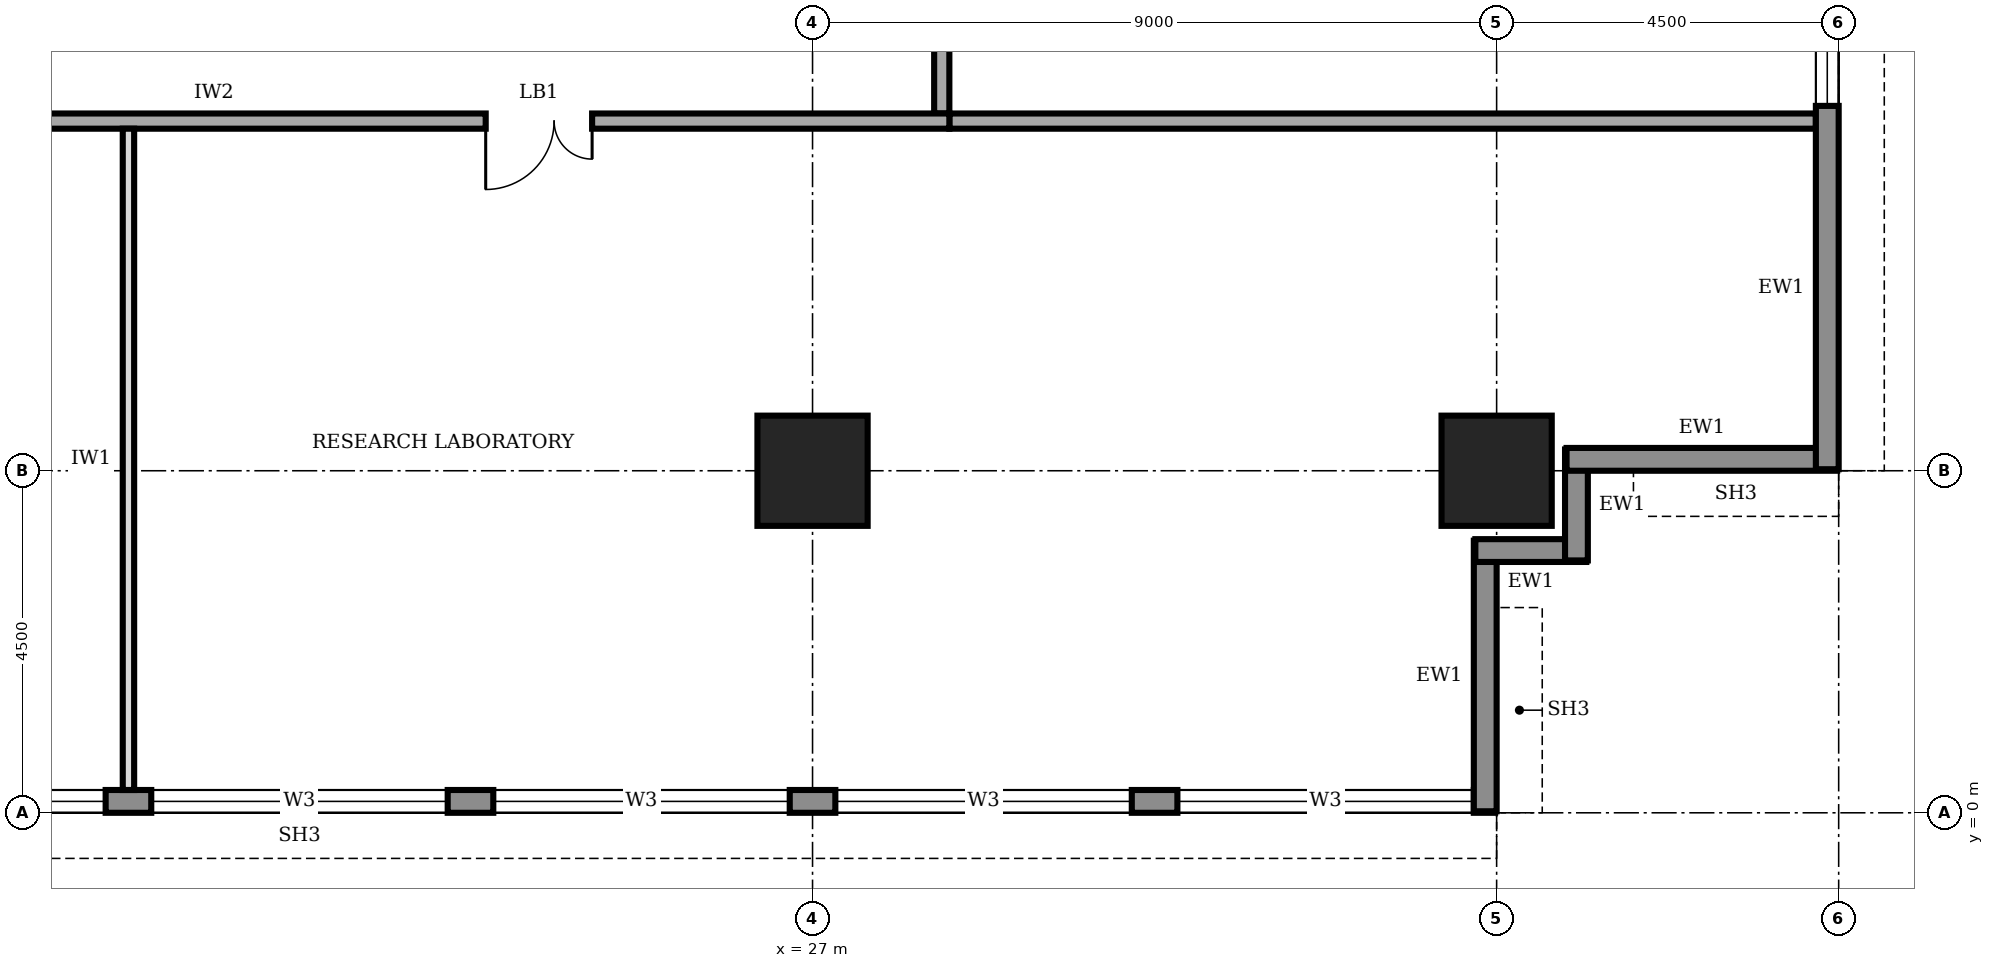
"""IFC4 building model, lengths in metres.
Left out: names, types, materials, properties, quantities, classifications, styles, units other than length and angle.
Written with IfcOpenShell. Run it as: python <this file> out.ifc"""

import sys

from ifc_helpers import new_model, si_unit, direction, frame, frame_2d, origin, origin_2d, place, context, subcontext, project, spatial, rectangle, extrude, element, fill, save


model = new_model("IFC4")
c1 = context("Model", 3, precision=1e-05, world=origin(), true_north=direction((0.0, 1.0)))
c2 = subcontext(c1, "Body", "Model", "MODEL_VIEW")
j1 = project(units=[si_unit("LENGTHUNIT", "METRE"), si_unit("PLANEANGLEUNIT", "RADIAN")], contexts=[c1])
p1 = place(None, origin())
s1 = spatial("IfcSite", under=j1, at=p1, CompositionType="ELEMENT")
p2 = place(p1, origin())
s2 = spatial("IfcBuilding", under=s1, at=p2, CompositionType="ELEMENT")
p3 = place(p2, frame((0.0, 0.0, 261.0)))
s3 = spatial("IfcBuildingStorey", under=s2, at=p3, CompositionType="ELEMENT", Elevation=261.0)
for number, where, z_axis, x_axis in (
    (1, (27.0, 4.5, 0.0), (0.0, 0.0, 1.0), (1.0, 0.0, 0.0)),
    (2, (36.0, 4.5, 0.0), (0.0, 0.0, 1.0), (1.0, 0.0, 0.0)),
):
    element("IfcColumn", number, at=place(p3, frame(where, z_axis=z_axis, x_axis=x_axis)), inside=s3, PredefinedType="COLUMN", context=c2, shape_type="SweptSolid", body=[
        extrude(rectangle(XDim=1.45, YDim=1.45, at=origin_2d()), origin(), (0.0, 0.0, 1.0), 4.0),
    ])
p4 = place(p3, frame((4.52, 0.15, 0.0), z_axis=(0.0, 0.0, 1.0), x_axis=(1.0, 0.0, 0.0)))
e3 = element("IfcWall", 3, at=p4, inside=s3, PredefinedType="STANDARD", context=c2, shape_type="SweptSolid", body=[
    extrude(rectangle(XDim=31.46, YDim=0.3, at=frame_2d((15.73, 0.0))), origin(), (0.0, 0.0, 1.0), 3.75),
])
p5 = place(p4, frame((4.78, 0.0, 0.95)))
e4 = element("IfcOpeningElement", 4, at=p5, cuts=e3, PredefinedType="OPENING", context=c2, shape_type="SweptSolid", body=[
    extrude(rectangle(XDim=3.9, YDim=1.8, at=frame_2d((1.95, 0.9))), frame((0.0, 0.16, 0.0), z_axis=(0.0, -1.0, 0.0), x_axis=(1.0, 0.0, 0.0)), (0.0, 0.0, 1.0), 0.32),
])
p6 = place(p4, frame((9.28, 0.0, 0.95)))
e5 = element("IfcOpeningElement", 5, at=p6, cuts=e3, PredefinedType="OPENING", context=c2, shape_type="SweptSolid", body=[
    extrude(rectangle(XDim=3.9, YDim=1.8, at=frame_2d((1.95, 0.9))), frame((0.0, 0.16, 0.0), z_axis=(0.0, -1.0, 0.0), x_axis=(1.0, 0.0, 0.0)), (0.0, 0.0, 1.0), 0.32),
])
p7 = place(p4, frame((13.78, 0.0, 0.95)))
e6 = element("IfcOpeningElement", 6, at=p7, cuts=e3, PredefinedType="OPENING", context=c2, shape_type="SweptSolid", body=[
    extrude(rectangle(XDim=3.9, YDim=1.8, at=frame_2d((1.95, 0.9))), frame((0.0, 0.16, 0.0), z_axis=(0.0, -1.0, 0.0), x_axis=(1.0, 0.0, 0.0)), (0.0, 0.0, 1.0), 0.32),
])
p8 = place(p4, frame((18.28, 0.0, 0.95)))
e7 = element("IfcOpeningElement", 7, at=p8, cuts=e3, PredefinedType="OPENING", context=c2, shape_type="SweptSolid", body=[
    extrude(rectangle(XDim=3.9, YDim=1.8, at=frame_2d((1.95, 0.9))), frame((0.0, 0.16, 0.0), z_axis=(0.0, -1.0, 0.0), x_axis=(1.0, 0.0, 0.0)), (0.0, 0.0, 1.0), 0.32),
])
p9 = place(p4, frame((22.78, 0.0, 0.95)))
e8 = element("IfcOpeningElement", 8, at=p9, cuts=e3, PredefinedType="OPENING", context=c2, shape_type="SweptSolid", body=[
    extrude(rectangle(XDim=3.9, YDim=1.8, at=frame_2d((1.95, 0.9))), frame((0.0, 0.16, 0.0), z_axis=(0.0, -1.0, 0.0), x_axis=(1.0, 0.0, 0.0)), (0.0, 0.0, 1.0), 0.32),
])
p10 = place(p4, frame((27.28, 0.0, 0.95)))
e9 = element("IfcOpeningElement", 9, at=p10, cuts=e3, PredefinedType="OPENING", context=c2, shape_type="SweptSolid", body=[
    extrude(rectangle(XDim=3.9, YDim=1.8, at=frame_2d((1.95, 0.9))), frame((0.0, 0.16, 0.0), z_axis=(0.0, -1.0, 0.0), x_axis=(1.0, 0.0, 0.0)), (0.0, 0.0, 1.0), 0.32),
])
p11 = place(p3, frame((35.85, 0.02, 0.0), z_axis=(0.0, 0.0, 1.0), x_axis=(0.0, 1.0, 0.0)))
e10 = element("IfcWall", 10, at=p11, inside=s3, PredefinedType="STANDARD", context=c2, shape_type="SweptSolid", body=[
    extrude(rectangle(XDim=3.56, YDim=0.3, at=frame_2d((1.78, 0.0))), origin(), (0.0, 0.0, 1.0), 2.85),
])
for number, where, z_axis, x_axis in (
    (11, (35.72, 3.45, 0.0), (0.0, 0.0, 1.0), (1.0, 0.0, 0.0)),
    (12, (37.05, 3.32, 0.0), (0.0, 0.0, 1.0), (0.0, 1.0, 0.0)),
):
    element("IfcWall", number, at=place(p3, frame(where, z_axis=z_axis, x_axis=x_axis)), inside=s3, PredefinedType="STANDARD", context=c2, shape_type="SweptSolid", body=[
        extrude(rectangle(XDim=1.46, YDim=0.3, at=frame_2d((0.73, 0.0))), origin(), (0.0, 0.0, 1.0), 3.75),
    ])
p12 = place(p3, frame((36.92, 4.65, 0.0), z_axis=(0.0, 0.0, 1.0), x_axis=(1.0, 0.0, 0.0)))
e13 = element("IfcWall", 13, at=p12, inside=s3, PredefinedType="STANDARD", context=c2, shape_type="SweptSolid", body=[
    extrude(rectangle(XDim=3.56, YDim=0.3, at=frame_2d((1.78, 0.0))), origin(), (0.0, 0.0, 1.0), 2.85),
])
p13 = place(p3, frame((40.35, 4.52, 0.0), z_axis=(0.0, 0.0, 1.0), x_axis=(0.0, 1.0, 0.0)))
e14 = element("IfcWall", 14, at=p13, inside=s3, PredefinedType="STANDARD", context=c2, shape_type="SweptSolid", body=[
    extrude(rectangle(XDim=31.46, YDim=0.3, at=frame_2d((15.73, 0.0))), origin(), (0.0, 0.0, 1.0), 3.75),
])
p14 = place(p13, frame((4.78, 0.0, 0.95)))
e15 = element("IfcOpeningElement", 15, at=p14, cuts=e14, PredefinedType="OPENING", context=c2, shape_type="SweptSolid", body=[
    extrude(rectangle(XDim=3.9, YDim=1.8, at=frame_2d((1.95, 0.9))), frame((0.0, 0.16, 0.0), z_axis=(0.0, -1.0, 0.0), x_axis=(1.0, 0.0, 0.0)), (0.0, 0.0, 1.0), 0.32),
])
p15 = place(p13, frame((9.28, 0.0, 0.95)))
e16 = element("IfcOpeningElement", 16, at=p15, cuts=e14, PredefinedType="OPENING", context=c2, shape_type="SweptSolid", body=[
    extrude(rectangle(XDim=3.9, YDim=1.8, at=frame_2d((1.95, 0.9))), frame((0.0, 0.16, 0.0), z_axis=(0.0, -1.0, 0.0), x_axis=(1.0, 0.0, 0.0)), (0.0, 0.0, 1.0), 0.32),
])
p16 = place(p13, frame((13.78, 0.0, 0.95)))
e17 = element("IfcOpeningElement", 17, at=p16, cuts=e14, PredefinedType="OPENING", context=c2, shape_type="SweptSolid", body=[
    extrude(rectangle(XDim=3.9, YDim=1.8, at=frame_2d((1.95, 0.9))), frame((0.0, 0.16, 0.0), z_axis=(0.0, -1.0, 0.0), x_axis=(1.0, 0.0, 0.0)), (0.0, 0.0, 1.0), 0.32),
])
p17 = place(p13, frame((18.28, 0.0, 0.95)))
e18 = element("IfcOpeningElement", 18, at=p17, cuts=e14, PredefinedType="OPENING", context=c2, shape_type="SweptSolid", body=[
    extrude(rectangle(XDim=3.9, YDim=1.8, at=frame_2d((1.95, 0.9))), frame((0.0, 0.16, 0.0), z_axis=(0.0, -1.0, 0.0), x_axis=(1.0, 0.0, 0.0)), (0.0, 0.0, 1.0), 0.32),
])
p18 = place(p13, frame((22.78, 0.0, 0.95)))
e19 = element("IfcOpeningElement", 19, at=p18, cuts=e14, PredefinedType="OPENING", context=c2, shape_type="SweptSolid", body=[
    extrude(rectangle(XDim=3.9, YDim=1.8, at=frame_2d((1.95, 0.9))), frame((0.0, 0.16, 0.0), z_axis=(0.0, -1.0, 0.0), x_axis=(1.0, 0.0, 0.0)), (0.0, 0.0, 1.0), 0.32),
])
p19 = place(p13, frame((27.28, 0.0, 0.95)))
e20 = element("IfcOpeningElement", 20, at=p19, cuts=e14, PredefinedType="OPENING", context=c2, shape_type="SweptSolid", body=[
    extrude(rectangle(XDim=3.9, YDim=1.8, at=frame_2d((1.95, 0.9))), frame((0.0, 0.16, 0.0), z_axis=(0.0, -1.0, 0.0), x_axis=(1.0, 0.0, 0.0)), (0.0, 0.0, 1.0), 0.32),
])
p20 = place(p3, frame((11.9, 9.1, 0.0), z_axis=(0.0, 0.0, 1.0), x_axis=(1.0, 0.0, 0.0)))
e21 = element("IfcWall", 21, at=p20, inside=s3, PredefinedType="SOLIDWALL", context=c2, shape_type="SweptSolid", body=[
    extrude(rectangle(XDim=16.9, YDim=0.2, at=frame_2d((8.45, 0.0))), origin(), (0.0, 0.0, 1.0), 3.75),
])
p21 = place(p20, frame((2.25, 0.0, 0.0)))
e22 = element("IfcOpeningElement", 22, at=p21, cuts=e21, PredefinedType="OPENING", context=c2, shape_type="SweptSolid", body=[
    extrude(rectangle(XDim=1.4, YDim=2.1, at=frame_2d((0.7, 1.05))), frame((0.0, 0.11, 0.0), z_axis=(0.0, -1.0, 0.0), x_axis=(1.0, 0.0, 0.0)), (0.0, 0.0, 1.0), 0.22),
])
p22 = place(p20, frame((10.8, 0.0, 0.0)))
e23 = element("IfcOpeningElement", 23, at=p22, cuts=e21, PredefinedType="OPENING", context=c2, shape_type="SweptSolid", body=[
    extrude(rectangle(XDim=1.4, YDim=2.1, at=frame_2d((0.7, 1.05))), frame((0.0, 0.11, 0.0), z_axis=(0.0, -1.0, 0.0), x_axis=(1.0, 0.0, 0.0)), (0.0, 0.0, 1.0), 0.22),
])
p23 = place(p3, frame((28.7, 9.2, 0.0), z_axis=(0.0, 0.0, 1.0), x_axis=(0.0, 1.0, 0.0)))
e24 = element("IfcWall", 24, at=p23, inside=s3, PredefinedType="SOLIDWALL", context=c2, shape_type="SweptSolid", body=[
    extrude(rectangle(XDim=22.3, YDim=0.2, at=frame_2d((11.15, 0.0))), origin(), (0.0, 0.0, 1.0), 3.75),
])
p24 = place(p23, frame((1.55, 0.0, 0.0)))
e25 = element("IfcOpeningElement", 25, at=p24, cuts=e24, PredefinedType="OPENING", context=c2, shape_type="SweptSolid", body=[
    extrude(rectangle(XDim=1.0, YDim=2.1, at=frame_2d((0.5, 1.05))), frame((0.0, 0.11, 0.0), z_axis=(0.0, -1.0, 0.0), x_axis=(1.0, 0.0, 0.0)), (0.0, 0.0, 1.0), 0.22),
])
p25 = place(p23, frame((6.05, 0.0, 0.0)))
e26 = element("IfcOpeningElement", 26, at=p25, cuts=e24, PredefinedType="OPENING", context=c2, shape_type="SweptSolid", body=[
    extrude(rectangle(XDim=1.0, YDim=2.1, at=frame_2d((0.5, 1.05))), frame((0.0, 0.11, 0.0), z_axis=(0.0, -1.0, 0.0), x_axis=(1.0, 0.0, 0.0)), (0.0, 0.0, 1.0), 0.22),
])
p26 = place(p23, frame((10.55, 0.0, 0.0)))
e27 = element("IfcOpeningElement", 27, at=p26, cuts=e24, PredefinedType="OPENING", context=c2, shape_type="SweptSolid", body=[
    extrude(rectangle(XDim=1.0, YDim=2.1, at=frame_2d((0.5, 1.05))), frame((0.0, 0.11, 0.0), z_axis=(0.0, -1.0, 0.0), x_axis=(1.0, 0.0, 0.0)), (0.0, 0.0, 1.0), 0.22),
])
p27 = place(p23, frame((15.05, 0.0, 0.0)))
e28 = element("IfcOpeningElement", 28, at=p27, cuts=e24, PredefinedType="OPENING", context=c2, shape_type="SweptSolid", body=[
    extrude(rectangle(XDim=1.0, YDim=2.1, at=frame_2d((0.5, 1.05))), frame((0.0, 0.11, 0.0), z_axis=(0.0, -1.0, 0.0), x_axis=(1.0, 0.0, 0.0)), (0.0, 0.0, 1.0), 0.22),
])
p28 = place(p23, frame((19.55, 0.0, 0.0)))
e29 = element("IfcOpeningElement", 29, at=p28, cuts=e24, PredefinedType="OPENING", context=c2, shape_type="SweptSolid", body=[
    extrude(rectangle(XDim=1.0, YDim=2.1, at=frame_2d((0.5, 1.05))), frame((0.0, 0.11, 0.0), z_axis=(0.0, -1.0, 0.0), x_axis=(1.0, 0.0, 0.0)), (0.0, 0.0, 1.0), 0.22),
])
p29 = place(p3, frame((28.8, 9.1, 0.0), z_axis=(0.0, 0.0, 1.0), x_axis=(1.0, 0.0, 0.0)))
e30 = element("IfcWall", 30, at=p29, inside=s3, PredefinedType="SOLIDWALL", context=c2, shape_type="SweptSolid", body=[
    extrude(rectangle(XDim=11.4, YDim=0.2, at=frame_2d((5.7, 0.0))), origin(), (0.0, 0.0, 1.0), 3.75),
])
p30 = place(p3, frame((18.0, 0.3, 0.0), z_axis=(0.0, 0.0, 1.0), x_axis=(0.0, 1.0, 0.0)))
e31 = element("IfcWall", 31, at=p30, inside=s3, PredefinedType="PARTITIONING", context=c2, shape_type="SweptSolid", body=[
    extrude(rectangle(XDim=8.7, YDim=0.15, at=frame_2d((4.35, 0.0))), origin(), (0.0, 0.0, 1.0), 3.75),
])
p31 = place(p6, origin())
e32 = element("IfcWindow", 32, at=p31, inside=s3, PartitioningType="SINGLE_PANEL", PredefinedType="WINDOW", context=c2, shape_type="SweptSolid", body=[
    extrude(rectangle(XDim=3.9, YDim=1.8, at=frame_2d((1.95, 0.9))), frame((0.0, 0.03, 0.0), z_axis=(0.0, -1.0, 0.0), x_axis=(1.0, 0.0, 0.0)), (0.0, 0.0, 1.0), 0.06),
])
fill(e5, e32)
p32 = place(p7, origin())
e33 = element("IfcWindow", 33, at=p32, inside=s3, PartitioningType="SINGLE_PANEL", PredefinedType="WINDOW", context=c2, shape_type="SweptSolid", body=[
    extrude(rectangle(XDim=3.9, YDim=1.8, at=frame_2d((1.95, 0.9))), frame((0.0, 0.03, 0.0), z_axis=(0.0, -1.0, 0.0), x_axis=(1.0, 0.0, 0.0)), (0.0, 0.0, 1.0), 0.06),
])
fill(e6, e33)
p33 = place(p8, origin())
e34 = element("IfcWindow", 34, at=p33, inside=s3, PartitioningType="SINGLE_PANEL", PredefinedType="WINDOW", context=c2, shape_type="SweptSolid", body=[
    extrude(rectangle(XDim=3.9, YDim=1.8, at=frame_2d((1.95, 0.9))), frame((0.0, 0.03, 0.0), z_axis=(0.0, -1.0, 0.0), x_axis=(1.0, 0.0, 0.0)), (0.0, 0.0, 1.0), 0.06),
])
fill(e7, e34)
p34 = place(p9, origin())
e35 = element("IfcWindow", 35, at=p34, inside=s3, PartitioningType="SINGLE_PANEL", PredefinedType="WINDOW", context=c2, shape_type="SweptSolid", body=[
    extrude(rectangle(XDim=3.9, YDim=1.8, at=frame_2d((1.95, 0.9))), frame((0.0, 0.03, 0.0), z_axis=(0.0, -1.0, 0.0), x_axis=(1.0, 0.0, 0.0)), (0.0, 0.0, 1.0), 0.06),
])
fill(e8, e35)
p35 = place(p10, origin())
e36 = element("IfcWindow", 36, at=p35, inside=s3, PartitioningType="SINGLE_PANEL", PredefinedType="WINDOW", context=c2, shape_type="SweptSolid", body=[
    extrude(rectangle(XDim=3.9, YDim=1.8, at=frame_2d((1.95, 0.9))), frame((0.0, 0.03, 0.0), z_axis=(0.0, -1.0, 0.0), x_axis=(1.0, 0.0, 0.0)), (0.0, 0.0, 1.0), 0.06),
])
fill(e9, e36)
p36 = place(p14, origin())
e37 = element("IfcWindow", 37, at=p36, inside=s3, PartitioningType="SINGLE_PANEL", PredefinedType="WINDOW", context=c2, shape_type="SweptSolid", body=[
    extrude(rectangle(XDim=3.9, YDim=1.8, at=frame_2d((1.95, 0.9))), frame((0.0, 0.03, 0.0), z_axis=(0.0, -1.0, 0.0), x_axis=(1.0, 0.0, 0.0)), (0.0, 0.0, 1.0), 0.06),
])
fill(e15, e37)
p37 = place(p22, frame((1.4, 0.0, 0.0), z_axis=(0.0, 0.0, 1.0), x_axis=(-1.0, 0.0, 0.0)))
e38 = element("IfcDoor", 38, at=p37, inside=s3, OperationType="DOUBLE_DOOR_SINGLE_SWING", PredefinedType="DOOR", context=c2, shape_type="SweptSolid", body=[
    extrude(rectangle(XDim=1.4, YDim=2.1, at=frame_2d((0.7, 1.05))), frame((0.0, 0.025, 0.0), z_axis=(0.0, -1.0, 0.0), x_axis=(1.0, 0.0, 0.0)), (0.0, 0.0, 1.0), 0.05),
])
fill(e23, e38)
save(model, sys.argv[1])
